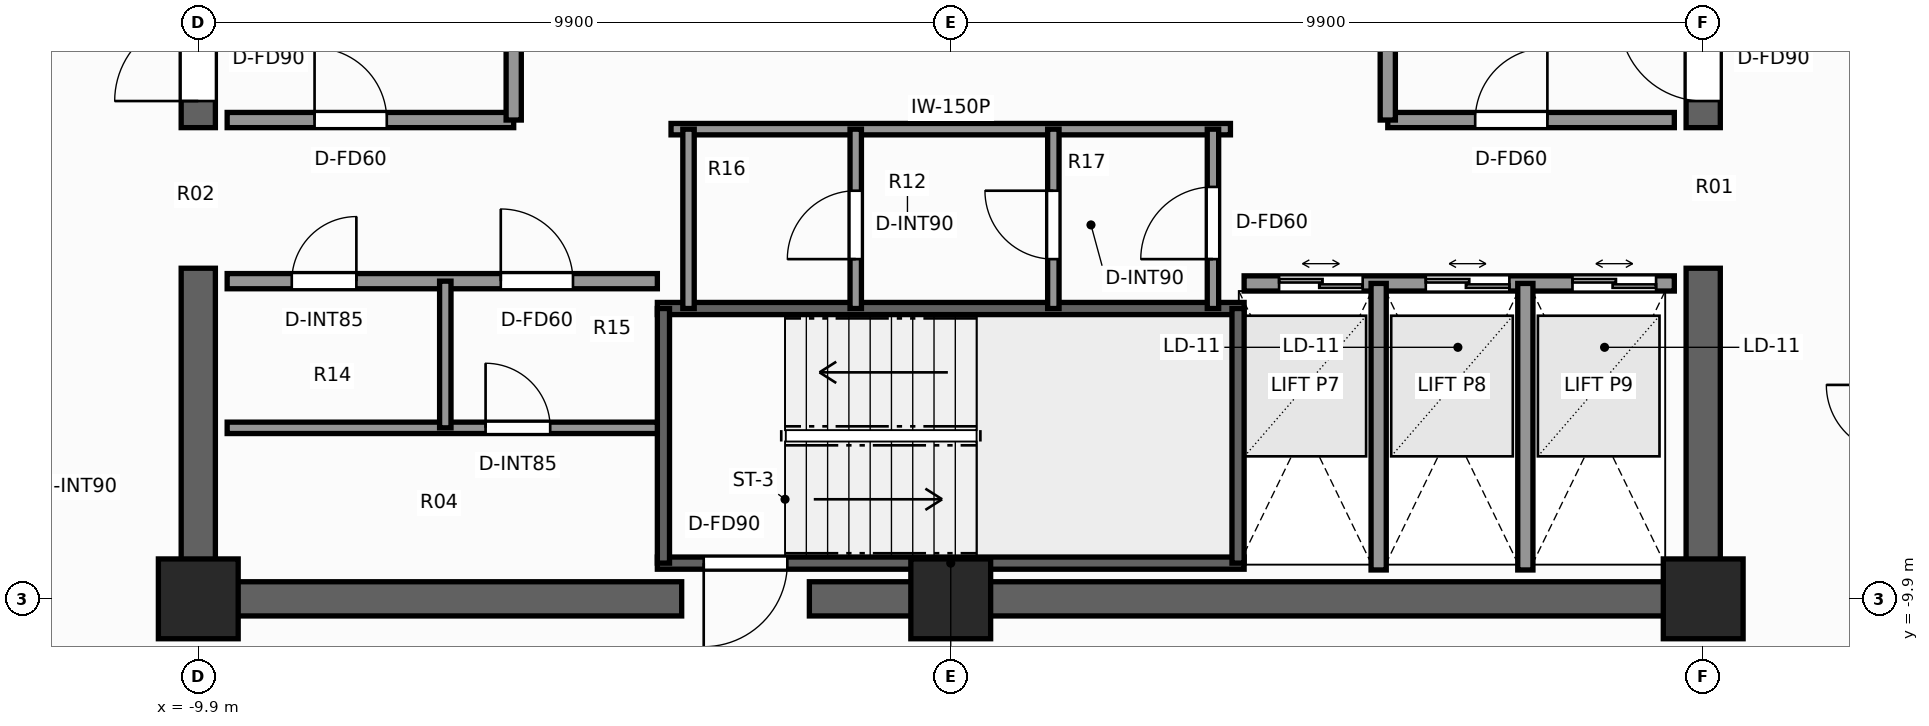
"""IFC4 building model, lengths in metres.
Left out: names, types, materials, properties, quantities, classifications, styles, units other than length and angle.
Written with IfcOpenShell. Run it as: python <this file> out.ifc"""

import sys

from ifc_helpers import new_model, si_unit, direction, frame, frame_2d, origin, origin_2d, place, context, subcontext, project, spatial, rectangle, extrude, element, fill, save


model = new_model("IFC4")
c1 = context("Model", 3, precision=1e-05, world=origin(), true_north=direction((0.0, 1.0)))
c2 = subcontext(c1, "Body", "Model", "MODEL_VIEW")
j1 = project(units=[si_unit("LENGTHUNIT", "METRE"), si_unit("PLANEANGLEUNIT", "RADIAN")], contexts=[c1])
p1 = place(None, origin())
s1 = spatial("IfcSite", under=j1, at=p1, CompositionType="ELEMENT")
p2 = place(p1, origin())
s2 = spatial("IfcBuilding", under=s1, at=p2, CompositionType="ELEMENT")
p3 = place(p2, frame((0.0, 0.0, 254.9)))
s3 = spatial("IfcBuildingStorey", under=s2, at=p3, CompositionType="ELEMENT", Elevation=254.9)
p4 = place(p3, frame((10.125, -9.9, 0.0), z_axis=(0.0, 0.0, 1.0), x_axis=(-1.0, 0.0, 0.0)))
e1 = element("IfcWall", 1, at=p4, inside=s3, PredefinedType="SHEAR", context=c2, shape_type="SweptSolid", body=[
    extrude(rectangle(XDim=11.985, YDim=0.45, at=frame_2d((5.993, 0.0))), origin(), (0.0, 0.0, 1.0), 3.5),
])
p5 = place(p3, frame((-3.54, -9.9, 0.0), z_axis=(0.0, 0.0, 1.0), x_axis=(-1.0, 0.0, 0.0)))
e2 = element("IfcWall", 2, at=p5, inside=s3, PredefinedType="SHEAR", context=c2, shape_type="SweptSolid", body=[
    extrude(rectangle(XDim=6.585, YDim=0.45, at=frame_2d((3.292, 0.0))), origin(), (0.0, 0.0, 1.0), 3.5),
])
for number, where, z_axis, x_axis in (
    (3, (-9.9, -9.675, 0.0), (0.0, 0.0, 1.0), (0.0, 1.0, 0.0)),
    (4, (9.9, -9.675, 0.0), (0.0, 0.0, 1.0), (0.0, 1.0, 0.0)),
):
    element("IfcWall", number, at=place(p3, frame(where, z_axis=z_axis, x_axis=x_axis)), inside=s3, PredefinedType="SHEAR", context=c2, shape_type="SweptSolid", body=[
        extrude(rectangle(XDim=4.125, YDim=0.45, at=frame_2d((2.062, 0.0))), origin(), (0.0, 0.0, 1.0), 3.5),
    ])
p6 = place(p3, frame((-9.9, -3.7, 0.0), z_axis=(0.0, 0.0, 1.0), x_axis=(0.0, 1.0, 0.0)))
e5 = element("IfcWall", 5, at=p6, inside=s3, PredefinedType="SHEAR", context=c2, shape_type="SweptSolid", body=[
    extrude(rectangle(XDim=13.375, YDim=0.45, at=frame_2d((6.688, 0.0))), origin(), (0.0, 0.0, 1.0), 3.5),
])
p7 = place(p6, frame((0.35, 0.0, 0.0)))
e6 = element("IfcOpeningElement", 6, at=p7, cuts=e5, PredefinedType="OPENING", context=c2, shape_type="SweptSolid", body=[
    extrude(rectangle(XDim=1.1, YDim=2.2, at=frame_2d((0.55, 1.1))), frame((0.0, 0.235, 0.0), z_axis=(0.0, -1.0, 0.0), x_axis=(1.0, 0.0, 0.0)), (0.0, 0.0, 1.0), 0.47),
])
p8 = place(p3, frame((9.9, -3.7, 0.0), z_axis=(0.0, 0.0, 1.0), x_axis=(0.0, 1.0, 0.0)))
e7 = element("IfcWall", 7, at=p8, inside=s3, PredefinedType="SHEAR", context=c2, shape_type="SweptSolid", body=[
    extrude(rectangle(XDim=13.375, YDim=0.45, at=frame_2d((6.688, 0.0))), origin(), (0.0, 0.0, 1.0), 3.5),
])
p9 = place(p8, frame((0.35, 0.0, 0.0)))
e8 = element("IfcOpeningElement", 8, at=p9, cuts=e7, PredefinedType="OPENING", context=c2, shape_type="SweptSolid", body=[
    extrude(rectangle(XDim=1.1, YDim=2.2, at=frame_2d((0.55, 1.1))), frame((0.0, 0.235, 0.0), z_axis=(0.0, -1.0, 0.0), x_axis=(1.0, 0.0, 0.0)), (0.0, 0.0, 1.0), 0.47),
])
for number, where, z_axis, x_axis in (
    (9, (-9.9, -9.9, 0.0), (0.0, 0.0, 1.0), (1.0, 0.0, 0.0)),
    (10, (9.9, -9.9, 0.0), (0.0, 0.0, 1.0), (1.0, 0.0, 0.0)),
    (11, (0.0, -9.9, 0.0), (0.0, 0.0, 1.0), (1.0, 0.0, 0.0)),
):
    element("IfcColumn", number, at=place(p3, frame(where, z_axis=z_axis, x_axis=x_axis)), inside=s3, PredefinedType="COLUMN", context=c2, shape_type="SweptSolid", body=[
        extrude(rectangle(XDim=1.05, YDim=1.05, at=origin_2d()), origin(), (0.0, 0.0, 1.0), 3.5),
    ])
p10 = place(p3, frame((3.86, -9.43, 0.0), z_axis=(0.0, 0.0, 1.0), x_axis=(-1.0, 0.0, 0.0)))
e12 = element("IfcWall", 12, at=p10, inside=s3, PredefinedType="SHEAR", context=c2, shape_type="SweptSolid", body=[
    extrude(rectangle(XDim=7.72, YDim=0.16, at=frame_2d((3.86, 0.0))), origin(), (0.0, 0.0, 1.0), 3.5),
])
p11 = place(p10, frame((6.01, 0.0, 0.0)))
e13 = element("IfcOpeningElement", 13, at=p11, cuts=e12, PredefinedType="OPENING", context=c2, shape_type="SweptSolid", body=[
    extrude(rectangle(XDim=1.1, YDim=2.2, at=frame_2d((0.55, 1.1))), frame((0.0, 0.09, 0.0), z_axis=(0.0, -1.0, 0.0), x_axis=(1.0, 0.0, 0.0)), (0.0, 0.0, 1.0), 0.18),
])
p12 = place(p3, frame((-3.86, -6.08, 0.0), z_axis=(0.0, 0.0, 1.0), x_axis=(1.0, 0.0, 0.0)))
e14 = element("IfcWall", 14, at=p12, inside=s3, PredefinedType="SHEAR", context=c2, shape_type="SweptSolid", body=[
    extrude(rectangle(XDim=7.72, YDim=0.16, at=frame_2d((3.86, 0.0))), origin(), (0.0, 0.0, 1.0), 3.5),
])
for number, where, z_axis, x_axis in (
    (15, (-3.78, -9.43, 0.0), (0.0, 0.0, 1.0), (0.0, 1.0, 0.0)),
    (16, (3.78, -9.43, 0.0), (0.0, 0.0, 1.0), (0.0, 1.0, 0.0)),
):
    element("IfcWall", number, at=place(p3, frame(where, z_axis=z_axis, x_axis=x_axis)), inside=s3, PredefinedType="SHEAR", context=c2, shape_type="SweptSolid", body=[
        extrude(rectangle(XDim=3.35, YDim=0.16, at=frame_2d((1.675, 0.0))), origin(), (0.0, 0.0, 1.0), 3.5),
    ])
p13 = place(p3, frame((-9.52, -3.6, 0.0), z_axis=(0.0, 0.0, 1.0), x_axis=(1.0, 0.0, 0.0)))
e17 = element("IfcWall", 17, at=p13, inside=s3, PredefinedType="SOLIDWALL", context=c2, shape_type="SweptSolid", body=[
    extrude(rectangle(XDim=3.77, YDim=0.2, at=frame_2d((1.885, 0.0))), origin(), (0.0, 0.0, 1.0), 3.22),
])
p14 = place(p13, frame((1.15, 0.0, 0.0)))
e18 = element("IfcOpeningElement", 18, at=p14, cuts=e17, PredefinedType="OPENING", context=c2, shape_type="SweptSolid", body=[
    extrude(rectangle(XDim=0.95, YDim=2.06, at=frame_2d((0.475, 1.03))), frame((0.0, 0.11, 0.0), z_axis=(0.0, -1.0, 0.0), x_axis=(1.0, 0.0, 0.0)), (0.0, 0.0, 1.0), 0.22),
])
p15 = place(p3, frame((-5.75, -3.6, 0.0), z_axis=(0.0, 0.0, 1.0), x_axis=(0.0, 1.0, 0.0)))
e19 = element("IfcWall", 19, at=p15, inside=s3, PredefinedType="SOLIDWALL", context=c2, shape_type="SweptSolid", body=[
    extrude(rectangle(XDim=5.57, YDim=0.2, at=frame_2d((2.785, 0.0))), origin(), (0.0, 0.0, 1.0), 3.22),
])
p16 = place(p15, frame((2.75, 0.0, 0.0)))
e20 = element("IfcOpeningElement", 20, at=p16, cuts=e19, PredefinedType="OPENING", context=c2, shape_type="SweptSolid", body=[
    extrude(rectangle(XDim=1.1, YDim=2.2, at=frame_2d((0.55, 1.1))), frame((0.0, 0.11, 0.0), z_axis=(0.0, -1.0, 0.0), x_axis=(1.0, 0.0, 0.0)), (0.0, 0.0, 1.0), 0.22),
])
p17 = place(p3, frame((5.75, -3.6, 0.0), z_axis=(0.0, 0.0, 1.0), x_axis=(1.0, 0.0, 0.0)))
e21 = element("IfcWall", 21, at=p17, inside=s3, PredefinedType="SOLIDWALL", context=c2, shape_type="SweptSolid", body=[
    extrude(rectangle(XDim=3.77, YDim=0.2, at=frame_2d((1.885, 0.0))), origin(), (0.0, 0.0, 1.0), 3.22),
])
p18 = place(p17, frame((1.15, 0.0, 0.0)))
e22 = element("IfcOpeningElement", 22, at=p18, cuts=e21, PredefinedType="OPENING", context=c2, shape_type="SweptSolid", body=[
    extrude(rectangle(XDim=0.95, YDim=2.06, at=frame_2d((0.475, 1.03))), frame((0.0, 0.11, 0.0), z_axis=(0.0, -1.0, 0.0), x_axis=(1.0, 0.0, 0.0)), (0.0, 0.0, 1.0), 0.22),
])
p19 = place(p3, frame((5.75, -3.6, 0.0), z_axis=(0.0, 0.0, 1.0), x_axis=(0.0, 1.0, 0.0)))
e23 = element("IfcWall", 23, at=p19, inside=s3, PredefinedType="SOLIDWALL", context=c2, shape_type="SweptSolid", body=[
    extrude(rectangle(XDim=5.57, YDim=0.2, at=frame_2d((2.785, 0.0))), origin(), (0.0, 0.0, 1.0), 3.22),
])
p20 = place(p19, frame((2.75, 0.0, 0.0)))
e24 = element("IfcOpeningElement", 24, at=p20, cuts=e23, PredefinedType="OPENING", context=c2, shape_type="SweptSolid", body=[
    extrude(rectangle(XDim=1.1, YDim=2.2, at=frame_2d((0.55, 1.1))), frame((0.0, 0.11, 0.0), z_axis=(0.0, -1.0, 0.0), x_axis=(1.0, 0.0, 0.0)), (0.0, 0.0, 1.0), 0.22),
])
p21 = place(p3, frame((-9.52, -5.72, 0.0), z_axis=(0.0, 0.0, 1.0), x_axis=(1.0, 0.0, 0.0)))
e25 = element("IfcWall", 25, at=p21, inside=s3, PredefinedType="SOLIDWALL", context=c2, shape_type="SweptSolid", body=[
    extrude(rectangle(XDim=5.66, YDim=0.2, at=frame_2d((2.83, 0.0))), origin(), (0.0, 0.0, 1.0), 3.22),
])
p22 = place(p21, frame((3.6, 0.0, 0.0)))
e26 = element("IfcOpeningElement", 26, at=p22, cuts=e25, PredefinedType="OPENING", context=c2, shape_type="SweptSolid", body=[
    extrude(rectangle(XDim=0.95, YDim=2.06, at=frame_2d((0.475, 1.03))), frame((0.0, 0.11, 0.0), z_axis=(0.0, -1.0, 0.0), x_axis=(1.0, 0.0, 0.0)), (0.0, 0.0, 1.0), 0.22),
])
p23 = place(p21, frame((0.85, 0.0, 0.0)))
e27 = element("IfcOpeningElement", 27, at=p23, cuts=e25, PredefinedType="OPENING", context=c2, shape_type="SweptSolid", body=[
    extrude(rectangle(XDim=0.85, YDim=2.03, at=frame_2d((0.425, 1.015))), frame((0.0, 0.11, 0.0), z_axis=(0.0, -1.0, 0.0), x_axis=(1.0, 0.0, 0.0)), (0.0, 0.0, 1.0), 0.22),
])
p24 = place(p3, frame((-9.52, -7.65, 0.0), z_axis=(0.0, 0.0, 1.0), x_axis=(1.0, 0.0, 0.0)))
e28 = element("IfcWall", 28, at=p24, inside=s3, PredefinedType="PARTITIONING", context=c2, shape_type="SweptSolid", body=[
    extrude(rectangle(XDim=5.66, YDim=0.15, at=frame_2d((2.83, 0.0))), origin(), (0.0, 0.0, 1.0), 3.22),
])
p25 = place(p24, frame((3.4, 0.0, 0.0)))
e29 = element("IfcOpeningElement", 29, at=p25, cuts=e28, PredefinedType="OPENING", context=c2, shape_type="SweptSolid", body=[
    extrude(rectangle(XDim=0.85, YDim=2.03, at=frame_2d((0.425, 1.015))), frame((0.0, 0.085, 0.0), z_axis=(0.0, -1.0, 0.0), x_axis=(1.0, 0.0, 0.0)), (0.0, 0.0, 1.0), 0.17),
])
p26 = place(p3, frame((-6.65, -7.65, 0.0), z_axis=(0.0, 0.0, 1.0), x_axis=(0.0, 1.0, 0.0)))
e30 = element("IfcWall", 30, at=p26, inside=s3, PredefinedType="PARTITIONING", context=c2, shape_type="SweptSolid", body=[
    extrude(rectangle(XDim=1.93, YDim=0.15, at=frame_2d((0.965, 0.0))), origin(), (0.0, 0.0, 1.0), 3.22),
])
p27 = place(p3, frame((3.86, -5.75, 0.0), z_axis=(0.0, 0.0, 1.0), x_axis=(1.0, 0.0, 0.0)))
e31 = element("IfcWall", 31, at=p27, inside=s3, PredefinedType="SOLIDWALL", context=c2, shape_type="SweptSolid", body=[
    extrude(rectangle(XDim=5.66, YDim=0.2, at=frame_2d((2.83, 0.0))), origin(), (0.0, 0.0, 1.0), 3.22),
])
p28 = place(p27, frame((0.46, 0.0, 0.0)))
e32 = element("IfcOpeningElement", 32, at=p28, cuts=e31, PredefinedType="OPENING", context=c2, shape_type="SweptSolid", body=[
    extrude(rectangle(XDim=1.1, YDim=2.2, at=frame_2d((0.55, 1.1))), frame((0.0, 0.11, 0.0), z_axis=(0.0, -1.0, 0.0), x_axis=(1.0, 0.0, 0.0)), (0.0, 0.0, 1.0), 0.22),
])
p29 = place(p27, frame((2.39, 0.0, 0.0)))
e33 = element("IfcOpeningElement", 33, at=p29, cuts=e31, PredefinedType="OPENING", context=c2, shape_type="SweptSolid", body=[
    extrude(rectangle(XDim=1.1, YDim=2.2, at=frame_2d((0.55, 1.1))), frame((0.0, 0.11, 0.0), z_axis=(0.0, -1.0, 0.0), x_axis=(1.0, 0.0, 0.0)), (0.0, 0.0, 1.0), 0.22),
])
p30 = place(p27, frame((4.32, 0.0, 0.0)))
e34 = element("IfcOpeningElement", 34, at=p30, cuts=e31, PredefinedType="OPENING", context=c2, shape_type="SweptSolid", body=[
    extrude(rectangle(XDim=1.1, YDim=2.2, at=frame_2d((0.55, 1.1))), frame((0.0, 0.11, 0.0), z_axis=(0.0, -1.0, 0.0), x_axis=(1.0, 0.0, 0.0)), (0.0, 0.0, 1.0), 0.22),
])
for number, where, z_axis, x_axis in (
    (35, (5.63, -9.52, 0.0), (0.0, 0.0, 1.0), (0.0, 1.0, 0.0)),
    (36, (7.56, -9.52, 0.0), (0.0, 0.0, 1.0), (0.0, 1.0, 0.0)),
):
    element("IfcWall", number, at=place(p3, frame(where, z_axis=z_axis, x_axis=x_axis)), inside=s3, PredefinedType="SOLIDWALL", context=c2, shape_type="SweptSolid", body=[
        extrude(rectangle(XDim=3.77, YDim=0.2, at=frame_2d((1.885, 0.0))), origin(), (0.0, 0.0, 1.0), 3.22),
    ])
p31 = place(p3, frame((-3.68, -3.72, 0.0), z_axis=(0.0, 0.0, 1.0), x_axis=(1.0, 0.0, 0.0)))
e37 = element("IfcWall", 37, at=p31, inside=s3, PredefinedType="PARTITIONING", context=c2, shape_type="SweptSolid", body=[
    extrude(rectangle(XDim=7.36, YDim=0.15, at=frame_2d((3.68, 0.0))), origin(), (0.0, 0.0, 1.0), 3.22),
])
p32 = place(p3, frame((3.45, -6.08, 0.0), z_axis=(0.0, 0.0, 1.0), x_axis=(0.0, 1.0, 0.0)))
e38 = element("IfcWall", 38, at=p32, inside=s3, PredefinedType="PARTITIONING", context=c2, shape_type="SweptSolid", body=[
    extrude(rectangle(XDim=2.36, YDim=0.15, at=frame_2d((1.18, 0.0))), origin(), (0.0, 0.0, 1.0), 3.22),
])
p33 = place(p32, frame((0.65, 0.0, 0.0)))
e39 = element("IfcOpeningElement", 39, at=p33, cuts=e38, PredefinedType="OPENING", context=c2, shape_type="SweptSolid", body=[
    extrude(rectangle(XDim=0.95, YDim=2.06, at=frame_2d((0.475, 1.03))), frame((0.0, 0.085, 0.0), z_axis=(0.0, -1.0, 0.0), x_axis=(1.0, 0.0, 0.0)), (0.0, 0.0, 1.0), 0.17),
])
p34 = place(p3, frame((-3.45, -6.08, 0.0), z_axis=(0.0, 0.0, 1.0), x_axis=(0.0, 1.0, 0.0)))
e40 = element("IfcWall", 40, at=p34, inside=s3, PredefinedType="PARTITIONING", context=c2, shape_type="SweptSolid", body=[
    extrude(rectangle(XDim=2.36, YDim=0.15, at=frame_2d((1.18, 0.0))), origin(), (0.0, 0.0, 1.0), 3.22),
])
p35 = place(p3, frame((1.35, -6.08, 0.0), z_axis=(0.0, 0.0, 1.0), x_axis=(0.0, 1.0, 0.0)))
e41 = element("IfcWall", 41, at=p35, inside=s3, PredefinedType="PARTITIONING", context=c2, shape_type="SweptSolid", body=[
    extrude(rectangle(XDim=2.36, YDim=0.15, at=frame_2d((1.18, 0.0))), origin(), (0.0, 0.0, 1.0), 3.22),
])
p36 = place(p35, frame((0.65, 0.0, 0.0)))
e42 = element("IfcOpeningElement", 42, at=p36, cuts=e41, PredefinedType="OPENING", context=c2, shape_type="SweptSolid", body=[
    extrude(rectangle(XDim=0.9, YDim=2.06, at=frame_2d((0.45, 1.03))), frame((0.0, 0.085, 0.0), z_axis=(0.0, -1.0, 0.0), x_axis=(1.0, 0.0, 0.0)), (0.0, 0.0, 1.0), 0.17),
])
p37 = place(p3, frame((-1.25, -6.08, 0.0), z_axis=(0.0, 0.0, 1.0), x_axis=(0.0, 1.0, 0.0)))
e43 = element("IfcWall", 43, at=p37, inside=s3, PredefinedType="PARTITIONING", context=c2, shape_type="SweptSolid", body=[
    extrude(rectangle(XDim=2.36, YDim=0.15, at=frame_2d((1.18, 0.0))), origin(), (0.0, 0.0, 1.0), 3.22),
])
p38 = place(p37, frame((0.65, 0.0, 0.0)))
e44 = element("IfcOpeningElement", 44, at=p38, cuts=e43, PredefinedType="OPENING", context=c2, shape_type="SweptSolid", body=[
    extrude(rectangle(XDim=0.9, YDim=2.06, at=frame_2d((0.45, 1.03))), frame((0.0, 0.085, 0.0), z_axis=(0.0, -1.0, 0.0), x_axis=(1.0, 0.0, 0.0)), (0.0, 0.0, 1.0), 0.17),
])
p39 = place(p11, origin())
e45 = element("IfcDoor", 45, at=p39, inside=s3, OperationType="SINGLE_SWING_RIGHT", PredefinedType="DOOR", context=c2, shape_type="SweptSolid", body=[
    extrude(rectangle(XDim=1.1, YDim=2.2, at=frame_2d((0.55, 1.1))), frame((0.0, 0.025, 0.0), z_axis=(0.0, -1.0, 0.0), x_axis=(1.0, 0.0, 0.0)), (0.0, 0.0, 1.0), 0.05),
])
fill(e13, e45)
p40 = place(p7, origin())
e46 = element("IfcDoor", 46, at=p40, inside=s3, OperationType="SINGLE_SWING_LEFT", PredefinedType="DOOR", context=c2, shape_type="SweptSolid", body=[
    extrude(rectangle(XDim=1.1, YDim=2.2, at=frame_2d((0.55, 1.1))), frame((0.0, 0.025, 0.0), z_axis=(0.0, -1.0, 0.0), x_axis=(1.0, 0.0, 0.0)), (0.0, 0.0, 1.0), 0.05),
])
fill(e6, e46)
p41 = place(p9, origin())
e47 = element("IfcDoor", 47, at=p41, inside=s3, OperationType="SINGLE_SWING_RIGHT", PredefinedType="DOOR", context=c2, shape_type="SweptSolid", body=[
    extrude(rectangle(XDim=1.1, YDim=2.2, at=frame_2d((0.55, 1.1))), frame((0.0, 0.025, 0.0), z_axis=(0.0, -1.0, 0.0), x_axis=(1.0, 0.0, 0.0)), (0.0, 0.0, 1.0), 0.05),
])
fill(e8, e47)
p42 = place(p22, origin())
e48 = element("IfcDoor", 48, at=p42, inside=s3, OperationType="SINGLE_SWING_LEFT", PredefinedType="DOOR", context=c2, shape_type="SweptSolid", body=[
    extrude(rectangle(XDim=0.95, YDim=2.06, at=frame_2d((0.475, 1.03))), frame((0.0, 0.025, 0.0), z_axis=(0.0, -1.0, 0.0), x_axis=(1.0, 0.0, 0.0)), (0.0, 0.0, 1.0), 0.05),
])
fill(e26, e48)
p43 = place(p23, origin())
e49 = element("IfcDoor", 49, at=p43, inside=s3, OperationType="SINGLE_SWING_RIGHT", PredefinedType="DOOR", context=c2, shape_type="SweptSolid", body=[
    extrude(rectangle(XDim=0.85, YDim=2.03, at=frame_2d((0.425, 1.015))), frame((0.0, 0.025, 0.0), z_axis=(0.0, -1.0, 0.0), x_axis=(1.0, 0.0, 0.0)), (0.0, 0.0, 1.0), 0.05),
])
fill(e27, e49)
p44 = place(p25, origin())
e50 = element("IfcDoor", 50, at=p44, inside=s3, OperationType="SINGLE_SWING_LEFT", PredefinedType="DOOR", context=c2, shape_type="SweptSolid", body=[
    extrude(rectangle(XDim=0.85, YDim=2.03, at=frame_2d((0.425, 1.015))), frame((0.0, 0.025, 0.0), z_axis=(0.0, -1.0, 0.0), x_axis=(1.0, 0.0, 0.0)), (0.0, 0.0, 1.0), 0.05),
])
fill(e29, e50)
p45 = place(p14, origin())
e51 = element("IfcDoor", 51, at=p45, inside=s3, OperationType="SINGLE_SWING_LEFT", PredefinedType="DOOR", context=c2, shape_type="SweptSolid", body=[
    extrude(rectangle(XDim=0.95, YDim=2.06, at=frame_2d((0.475, 1.03))), frame((0.0, 0.025, 0.0), z_axis=(0.0, -1.0, 0.0), x_axis=(1.0, 0.0, 0.0)), (0.0, 0.0, 1.0), 0.05),
])
fill(e18, e51)
p46 = place(p28, origin())
e52 = element("IfcDoor", 52, at=p46, inside=s3, OperationType="DOUBLE_DOOR_SLIDING", PredefinedType="DOOR", context=c2, shape_type="SweptSolid", body=[
    extrude(rectangle(XDim=1.1, YDim=2.2, at=frame_2d((0.55, 1.1))), frame((0.0, 0.025, 0.0), z_axis=(0.0, -1.0, 0.0), x_axis=(1.0, 0.0, 0.0)), (0.0, 0.0, 1.0), 0.05),
])
fill(e32, e52)
p47 = place(p29, origin())
e53 = element("IfcDoor", 53, at=p47, inside=s3, OperationType="DOUBLE_DOOR_SLIDING", PredefinedType="DOOR", context=c2, shape_type="SweptSolid", body=[
    extrude(rectangle(XDim=1.1, YDim=2.2, at=frame_2d((0.55, 1.1))), frame((0.0, 0.025, 0.0), z_axis=(0.0, -1.0, 0.0), x_axis=(1.0, 0.0, 0.0)), (0.0, 0.0, 1.0), 0.05),
])
fill(e33, e53)
p48 = place(p30, origin())
e54 = element("IfcDoor", 54, at=p48, inside=s3, OperationType="DOUBLE_DOOR_SLIDING", PredefinedType="DOOR", context=c2, shape_type="SweptSolid", body=[
    extrude(rectangle(XDim=1.1, YDim=2.2, at=frame_2d((0.55, 1.1))), frame((0.0, 0.025, 0.0), z_axis=(0.0, -1.0, 0.0), x_axis=(1.0, 0.0, 0.0)), (0.0, 0.0, 1.0), 0.05),
])
fill(e34, e54)
p49 = place(p18, origin())
e55 = element("IfcDoor", 55, at=p49, inside=s3, OperationType="SINGLE_SWING_RIGHT", PredefinedType="DOOR", context=c2, shape_type="SweptSolid", body=[
    extrude(rectangle(XDim=0.95, YDim=2.06, at=frame_2d((0.475, 1.03))), frame((0.0, 0.025, 0.0), z_axis=(0.0, -1.0, 0.0), x_axis=(1.0, 0.0, 0.0)), (0.0, 0.0, 1.0), 0.05),
])
fill(e22, e55)
p50 = place(p33, origin())
e56 = element("IfcDoor", 56, at=p50, inside=s3, OperationType="SINGLE_SWING_LEFT", PredefinedType="DOOR", context=c2, shape_type="SweptSolid", body=[
    extrude(rectangle(XDim=0.95, YDim=2.06, at=frame_2d((0.475, 1.03))), frame((0.0, 0.025, 0.0), z_axis=(0.0, -1.0, 0.0), x_axis=(1.0, 0.0, 0.0)), (0.0, 0.0, 1.0), 0.05),
])
fill(e39, e56)
p51 = place(p36, origin())
e57 = element("IfcDoor", 57, at=p51, inside=s3, OperationType="SINGLE_SWING_RIGHT", PredefinedType="DOOR", context=c2, shape_type="SweptSolid", body=[
    extrude(rectangle(XDim=0.9, YDim=2.06, at=frame_2d((0.45, 1.03))), frame((0.0, 0.025, 0.0), z_axis=(0.0, -1.0, 0.0), x_axis=(1.0, 0.0, 0.0)), (0.0, 0.0, 1.0), 0.05),
])
fill(e42, e57)
p52 = place(p38, origin())
e58 = element("IfcDoor", 58, at=p52, inside=s3, OperationType="SINGLE_SWING_LEFT", PredefinedType="DOOR", context=c2, shape_type="SweptSolid", body=[
    extrude(rectangle(XDim=0.9, YDim=2.06, at=frame_2d((0.45, 1.03))), frame((0.0, 0.025, 0.0), z_axis=(0.0, -1.0, 0.0), x_axis=(1.0, 0.0, 0.0)), (0.0, 0.0, 1.0), 0.05),
])
fill(e44, e58)
save(model, sys.argv[1])
